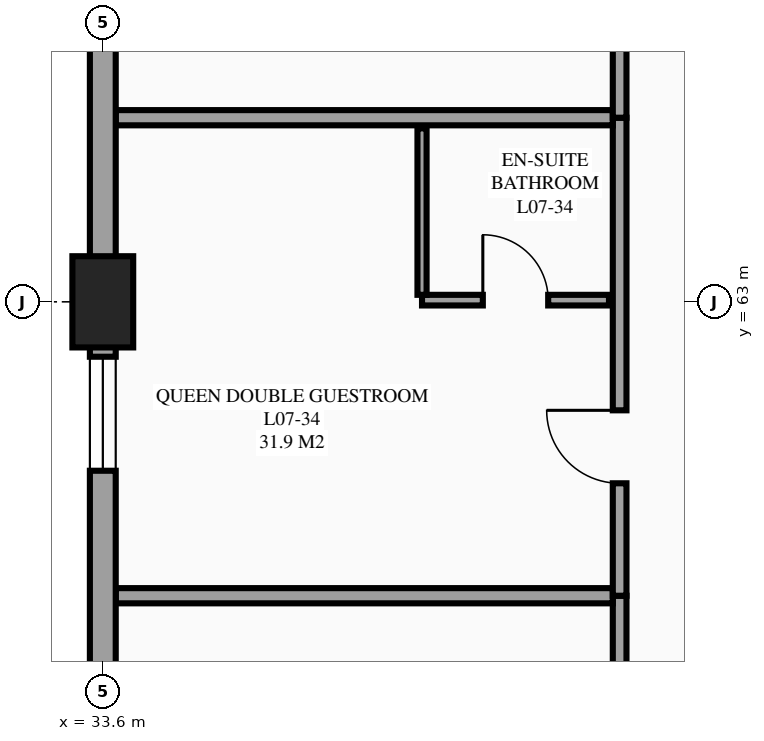
"""IFC4 building model, lengths in metres.
Left out: names, types, materials, properties, quantities, classifications, styles, units other than length and angle.
Written with IfcOpenShell. Run it as: python <this file> out.ifc"""

import sys

from ifc_helpers import new_model, si_unit, direction, frame, frame_2d, origin, origin_2d, place, context, subcontext, project, spatial, rectangle, extrude, element, fill, save


model = new_model("IFC4")
c1 = context("Model", 3, precision=1e-05, world=origin(), true_north=direction((0.0, 1.0)))
c2 = subcontext(c1, "Body", "Model", "MODEL_VIEW")
j1 = project(units=[si_unit("LENGTHUNIT", "METRE"), si_unit("PLANEANGLEUNIT", "RADIAN")], contexts=[c1])
p1 = place(None, origin())
s1 = spatial("IfcSite", under=j1, at=p1, CompositionType="ELEMENT")
p2 = place(p1, origin())
s2 = spatial("IfcBuilding", under=s1, at=p2, CompositionType="ELEMENT")
p3 = place(p2, frame((0.0, 0.0, 29.1)))
s3 = spatial("IfcBuildingStorey", under=s2, at=p3, CompositionType="ELEMENT", Elevation=29.1)
p4 = place(p3, frame((33.6, 63.0, 0.0), z_axis=(0.0, 0.0, 1.0), x_axis=(1.0, 0.0, 0.0)))
e1 = element("IfcColumn", 1, at=p4, inside=s3, PredefinedType="COLUMN", context=c2, shape_type="SweptSolid", body=[
    extrude(rectangle(XDim=0.8, YDim=1.2, at=origin_2d()), origin(), (0.0, 0.0, 1.0), 3.6),
])
p5 = place(p3, frame((40.4, 52.844, 0.0), z_axis=(0.0, 0.0, 1.0), x_axis=(0.0, 1.0, 0.0)))
e2 = element("IfcWall", 2, at=p5, inside=s3, PredefinedType="PARTITIONING", context=c2, shape_type="SweptSolid", body=[
    extrude(rectangle(XDim=6.289, YDim=0.18, at=frame_2d((3.145, 0.0))), origin(), (0.0, 0.0, 1.0), 3.375),
])
p6 = place(p5, frame((3.85, 0.0, 0.0)))
e3 = element("IfcOpeningElement", 3, at=p6, cuts=e2, PredefinedType="OPENING", context=c2, shape_type="SweptSolid", body=[
    extrude(rectangle(XDim=0.96, YDim=2.15, at=frame_2d((0.48, 1.075))), frame((0.0, 0.1, 0.0), z_axis=(0.0, -1.0, 0.0), x_axis=(1.0, 0.0, 0.0)), (0.0, 0.0, 1.0), 0.2),
])
p7 = place(p3, frame((33.77, 59.133, 0.0), z_axis=(0.0, 0.0, 1.0), x_axis=(1.0, 0.0, 0.0)))
e4 = element("IfcWall", 4, at=p7, inside=s3, PredefinedType="PARTITIONING", context=c2, shape_type="SweptSolid", body=[
    extrude(rectangle(XDim=6.54, YDim=0.2, at=frame_2d((3.27, 0.0))), origin(), (0.0, 0.0, 1.0), 3.375),
])
p8 = place(p3, frame((40.4, 59.133, 0.0), z_axis=(0.0, 0.0, 1.0), x_axis=(0.0, 1.0, 0.0)))
e5 = element("IfcWall", 5, at=p8, inside=s3, PredefinedType="PARTITIONING", context=c2, shape_type="SweptSolid", body=[
    extrude(rectangle(XDim=6.289, YDim=0.18, at=frame_2d((3.145, 0.0))), origin(), (0.0, 0.0, 1.0), 3.375),
])
p9 = place(p8, frame((1.479, 0.0, 0.0)))
e6 = element("IfcOpeningElement", 6, at=p9, cuts=e5, PredefinedType="OPENING", context=c2, shape_type="SweptSolid", body=[
    extrude(rectangle(XDim=0.96, YDim=2.15, at=frame_2d((0.48, 1.075))), frame((0.0, 0.1, 0.0), z_axis=(0.0, -1.0, 0.0), x_axis=(1.0, 0.0, 0.0)), (0.0, 0.0, 1.0), 0.2),
])
p10 = place(p3, frame((33.77, 65.422, 0.0), z_axis=(0.0, 0.0, 1.0), x_axis=(1.0, 0.0, 0.0)))
e7 = element("IfcWall", 7, at=p10, inside=s3, PredefinedType="PARTITIONING", context=c2, shape_type="SweptSolid", body=[
    extrude(rectangle(XDim=6.54, YDim=0.2, at=frame_2d((3.27, 0.0))), origin(), (0.0, 0.0, 1.0), 3.375),
])
p11 = place(p3, frame((37.8, 63.022, 0.0), z_axis=(0.0, 0.0, 1.0), x_axis=(1.0, 0.0, 0.0)))
e8 = element("IfcWall", 8, at=p11, inside=s3, PredefinedType="PARTITIONING", context=c2, shape_type="SweptSolid", body=[
    extrude(rectangle(XDim=2.46, YDim=0.14, at=frame_2d((1.23, 0.0))), origin(), (0.0, 0.0, 1.0), 2.68),
])
p12 = place(p11, frame((0.8, 0.0, 0.0)))
e9 = element("IfcOpeningElement", 9, at=p12, cuts=e8, PredefinedType="OPENING", context=c2, shape_type="SweptSolid", body=[
    extrude(rectangle(XDim=0.86, YDim=2.1, at=frame_2d((0.43, 1.05))), frame((0.0, 0.08, 0.0), z_axis=(0.0, -1.0, 0.0), x_axis=(1.0, 0.0, 0.0)), (0.0, 0.0, 1.0), 0.16),
])
p13 = place(p3, frame((37.8, 63.092, 0.0), z_axis=(0.0, 0.0, 1.0), x_axis=(0.0, 1.0, 0.0)))
e10 = element("IfcWall", 10, at=p13, inside=s3, PredefinedType="PARTITIONING", context=c2, shape_type="SweptSolid", body=[
    extrude(rectangle(XDim=2.19, YDim=0.12, at=frame_2d((1.095, 0.0))), origin(), (0.0, 0.0, 1.0), 3.375),
])
p14 = place(p3, frame((40.4, 65.422, 0.0), z_axis=(0.0, 0.0, 1.0), x_axis=(0.0, 1.0, 0.0)))
e11 = element("IfcWall", 11, at=p14, inside=s3, PredefinedType="PARTITIONING", context=c2, shape_type="SweptSolid", body=[
    extrude(rectangle(XDim=6.289, YDim=0.18, at=frame_2d((3.145, 0.0))), origin(), (0.0, 0.0, 1.0), 3.375),
])
p15 = place(p14, frame((1.479, 0.0, 0.0)))
e12 = element("IfcOpeningElement", 12, at=p15, cuts=e11, PredefinedType="OPENING", context=c2, shape_type="SweptSolid", body=[
    extrude(rectangle(XDim=0.96, YDim=2.15, at=frame_2d((0.48, 1.075))), frame((0.0, 0.1, 0.0), z_axis=(0.0, -1.0, 0.0), x_axis=(1.0, 0.0, 0.0)), (0.0, 0.0, 1.0), 0.2),
])
p16 = place(p3, frame((33.6, 79.8, 0.0), z_axis=(0.0, 0.0, 1.0), x_axis=(0.0, -1.0, 0.0)))
e13 = element("IfcWall", 13, at=p16, inside=s3, PredefinedType="STANDARD", context=c2, shape_type="SweptSolid", body=[
    extrude(rectangle(XDim=16.8, YDim=0.34, at=frame_2d((8.4, 0.0))), origin(), (0.0, 0.0, 1.0), 2.63),
])
p17 = place(p16, frame((10.483, 0.0, 0.85)))
e14 = element("IfcOpeningElement", 14, at=p17, cuts=e13, PredefinedType="OPENING", context=c2, shape_type="SweptSolid", body=[
    extrude(rectangle(XDim=1.5, YDim=1.5, at=frame_2d((0.75, 0.75))), frame((0.0, 0.18, 0.0), z_axis=(0.0, -1.0, 0.0), x_axis=(1.0, 0.0, 0.0)), (0.0, 0.0, 1.0), 0.36),
])
p18 = place(p16, frame((4.195, 0.0, 0.85)))
e15 = element("IfcOpeningElement", 15, at=p18, cuts=e13, PredefinedType="OPENING", context=c2, shape_type="SweptSolid", body=[
    extrude(rectangle(XDim=1.5, YDim=1.5, at=frame_2d((0.75, 0.75))), frame((0.0, 0.18, 0.0), z_axis=(0.0, -1.0, 0.0), x_axis=(1.0, 0.0, 0.0)), (0.0, 0.0, 1.0), 0.36),
])
p19 = place(p3, frame((33.6, 63.0, 0.0), z_axis=(0.0, 0.0, 1.0), x_axis=(0.0, -1.0, 0.0)))
e16 = element("IfcWall", 16, at=p19, inside=s3, PredefinedType="STANDARD", context=c2, shape_type="SweptSolid", body=[
    extrude(rectangle(XDim=8.4, YDim=0.34, at=frame_2d((4.2, 0.0))), origin(), (0.0, 0.0, 1.0), 3.126),
])
p20 = place(p19, frame((6.261, 0.0, 0.85)))
e17 = element("IfcOpeningElement", 17, at=p20, cuts=e16, PredefinedType="OPENING", context=c2, shape_type="SweptSolid", body=[
    extrude(rectangle(XDim=1.5, YDim=1.5, at=frame_2d((0.75, 0.75))), frame((0.0, 0.18, 0.0), z_axis=(0.0, -1.0, 0.0), x_axis=(1.0, 0.0, 0.0)), (0.0, 0.0, 1.0), 0.36),
])
p21 = place(p19, frame((0.722, 0.0, 0.85)))
e18 = element("IfcOpeningElement", 18, at=p21, cuts=e16, PredefinedType="OPENING", context=c2, shape_type="SweptSolid", body=[
    extrude(rectangle(XDim=1.5, YDim=1.5, at=frame_2d((0.75, 0.75))), frame((0.0, 0.18, 0.0), z_axis=(0.0, -1.0, 0.0), x_axis=(1.0, 0.0, 0.0)), (0.0, 0.0, 1.0), 0.36),
])
p22 = place(p21, origin())
e19 = element("IfcWindow", 19, at=p22, inside=s3, PartitioningType="SINGLE_PANEL", PredefinedType="WINDOW", context=c2, shape_type="SweptSolid", body=[
    extrude(rectangle(XDim=1.5, YDim=1.5, at=frame_2d((0.75, 0.75))), frame((0.0, 0.03, 0.0), z_axis=(0.0, -1.0, 0.0), x_axis=(1.0, 0.0, 0.0)), (0.0, 0.0, 1.0), 0.06),
])
fill(e18, e19)
p23 = place(p9, origin())
e20 = element("IfcDoor", 20, at=p23, inside=s3, OperationType="SINGLE_SWING_RIGHT", PredefinedType="DOOR", context=c2, shape_type="SweptSolid", body=[
    extrude(rectangle(XDim=0.96, YDim=2.15, at=frame_2d((0.48, 1.075))), frame((0.0, 0.025, 0.0), z_axis=(0.0, -1.0, 0.0), x_axis=(1.0, 0.0, 0.0)), (0.0, 0.0, 1.0), 0.05),
])
fill(e6, e20)
p24 = place(p12, origin())
e21 = element("IfcDoor", 21, at=p24, inside=s3, OperationType="SINGLE_SWING_LEFT", PredefinedType="DOOR", context=c2, shape_type="SweptSolid", body=[
    extrude(rectangle(XDim=0.86, YDim=2.1, at=frame_2d((0.43, 1.05))), frame((0.0, 0.025, 0.0), z_axis=(0.0, -1.0, 0.0), x_axis=(1.0, 0.0, 0.0)), (0.0, 0.0, 1.0), 0.05),
])
fill(e9, e21)
save(model, sys.argv[1])
